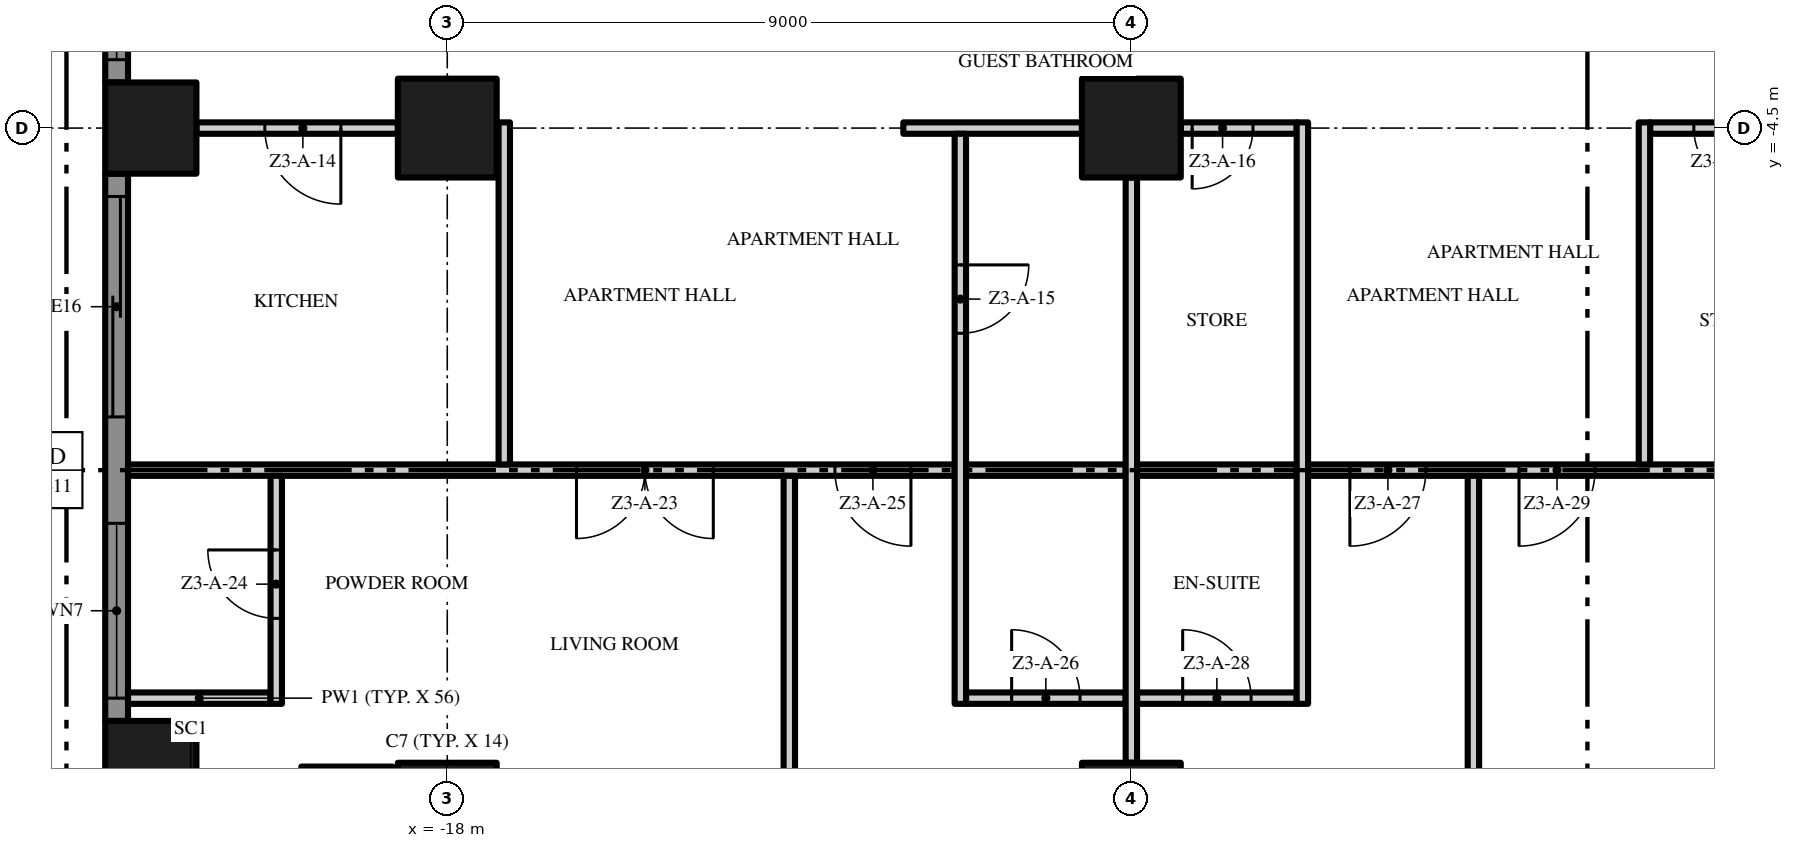
"""IFC4 building model, lengths in metres.
Left out: names, types, materials, properties, quantities, classifications, styles, units other than length and angle.
Written with IfcOpenShell. Run it as: python <this file> out.ifc"""

import sys

from ifc_helpers import new_model, si_unit, direction, frame, frame_2d, origin, origin_2d, place, context, subcontext, project, spatial, polyline, rectangle, outline, extrude, element, fill, save


model = new_model("IFC4")
c1 = context("Model", 3, precision=1e-05, world=origin(), true_north=direction((0.0, 1.0)))
c2 = subcontext(c1, "Body", "Model", "MODEL_VIEW")
j1 = project(units=[si_unit("LENGTHUNIT", "METRE"), si_unit("PLANEANGLEUNIT", "RADIAN")], contexts=[c1])
p1 = place(None, origin())
s1 = spatial("IfcSite", under=j1, at=p1, CompositionType="ELEMENT")
p2 = place(p1, origin())
s2 = spatial("IfcBuilding", under=s1, at=p2, CompositionType="ELEMENT")
p3 = place(p2, frame((0.0, 0.0, 132.6)))
s3 = spatial("IfcBuildingStorey", under=s2, at=p3, CompositionType="ELEMENT", Elevation=132.6)
for number, where, z_axis, x_axis in (
    (1, (-18.0, -13.5, 0.0), (0.0, 0.0, 1.0), (1.0, 0.0, 0.0)),
    (2, (-18.0, -4.5, 0.0), (0.0, 0.0, 1.0), (1.0, 0.0, 0.0)),
):
    element("IfcColumn", number, at=place(p3, frame(where, z_axis=z_axis, x_axis=x_axis)), inside=s3, PredefinedType="COLUMN", context=c2, shape_type="SweptSolid", body=[
        extrude(rectangle(XDim=1.3, YDim=1.3, at=origin_2d()), origin(), (0.0, 0.0, 1.0), 3.5),
    ])
for number, where, z_axis, x_axis in (
    (3, (-21.9, -12.9, 0.0), (0.0, 0.0, 1.0), (1.0, 0.0, 0.0)),
    (4, (-19.32, -13.5, 0.0), (0.0, 0.0, 1.0), (1.0, 0.0, 0.0)),
    (5, (-21.9, -4.5, 0.0), (0.0, 0.0, 1.0), (1.0, 0.0, 0.0)),
):
    element("IfcColumn", number, at=place(p3, frame(where, z_axis=z_axis, x_axis=x_axis)), inside=s3, PredefinedType="COLUMN", context=c2, shape_type="SweptSolid", body=[
        extrude(rectangle(XDim=1.2, YDim=1.2, at=origin_2d()), origin(), (0.0, 0.0, 1.0), 3.5),
    ])
for number, where, z_axis, x_axis in (
    (6, (-9.0, -13.5, 0.0), (0.0, 0.0, 1.0), (1.0, 0.0, 0.0)),
    (7, (-9.0, -4.5, 0.0), (0.0, 0.0, 1.0), (1.0, 0.0, 0.0)),
):
    element("IfcColumn", number, at=place(p3, frame(where, z_axis=z_axis, x_axis=x_axis)), inside=s3, PredefinedType="COLUMN", context=c2, shape_type="SweptSolid", body=[
        extrude(rectangle(XDim=1.3, YDim=1.3, at=origin_2d()), origin(), (0.0, 0.0, 1.0), 3.5),
    ])
p4 = place(p3, frame((-22.35, -3.9, 0.0), z_axis=(0.0, 0.0, 1.0), x_axis=(0.0, 1.0, 0.0)))
e8 = element("IfcWall", 8, at=p4, inside=s3, PredefinedType="SOLIDWALL", context=c2, shape_type="SweptSolid", body=[
    extrude(rectangle(XDim=7.8, YDim=0.3, at=frame_2d((3.9, 0.0))), origin(), (0.0, 0.0, 1.0), 3.5),
])
p5 = place(p4, frame((4.6, 0.0, 0.45)))
e9 = element("IfcOpeningElement", 9, at=p5, cuts=e8, PredefinedType="OPENING", context=c2, shape_type="SweptSolid", body=[
    extrude(rectangle(XDim=2.9, YDim=2.65, at=frame_2d((1.45, 1.325))), frame((0.0, 0.16, 0.0), z_axis=(0.0, -1.0, 0.0), x_axis=(1.0, 0.0, 0.0)), (0.0, 0.0, 1.0), 0.32),
])
p6 = place(p4, frame((0.3, 0.0, 0.45)))
e10 = element("IfcOpeningElement", 10, at=p6, cuts=e8, PredefinedType="OPENING", context=c2, shape_type="SweptSolid", body=[
    extrude(rectangle(XDim=2.9, YDim=2.65, at=frame_2d((1.45, 1.325))), frame((0.0, 0.16, 0.0), z_axis=(0.0, -1.0, 0.0), x_axis=(1.0, 0.0, 0.0)), (0.0, 0.0, 1.0), 0.32),
])
p7 = place(p3, frame((-22.35, -12.3, 0.0), z_axis=(0.0, 0.0, 1.0), x_axis=(0.0, 1.0, 0.0)))
e11 = element("IfcWall", 11, at=p7, inside=s3, PredefinedType="SOLIDWALL", context=c2, shape_type="SweptSolid", body=[
    extrude(rectangle(XDim=7.2, YDim=0.3, at=frame_2d((3.6, 0.0))), origin(), (0.0, 0.0, 1.0), 3.5),
])
p8 = place(p7, frame((4.0, 0.0, 0.0)))
e12 = element("IfcOpeningElement", 12, at=p8, cuts=e11, PredefinedType="OPENING", context=c2, shape_type="SweptSolid", body=[
    extrude(rectangle(XDim=2.9, YDim=2.4, at=frame_2d((1.45, 1.2))), frame((0.0, 0.16, 0.0), z_axis=(0.0, -1.0, 0.0), x_axis=(1.0, 0.0, 0.0)), (0.0, 0.0, 1.0), 0.32),
])
p9 = place(p7, frame((0.3, 0.0, 0.45)))
e13 = element("IfcOpeningElement", 13, at=p9, cuts=e11, PredefinedType="OPENING", context=c2, shape_type="SweptSolid", body=[
    extrude(rectangle(XDim=2.3, YDim=2.65, at=frame_2d((1.15, 1.325))), frame((0.0, 0.16, 0.0), z_axis=(0.0, -1.0, 0.0), x_axis=(1.0, 0.0, 0.0)), (0.0, 0.0, 1.0), 0.32),
])
p10 = place(p3, origin())
e14 = element("IfcWall", 14, at=p10, inside=s3, PredefinedType="USERDEFINED", context=c2, shape_type="SweptSolid", body=[
    extrude(outline(polyline([(-23.451, 18.0), (-23.115, 16.5), (-23.1, 16.125), (-23.231, 15.0), (-23.755, 13.5), (-24.488, 12.0), (-25.149, 10.5), (-25.485, 9.0), (-25.5, 8.625), (-25.369, 7.5), (-24.845, 6.0), (-24.112, 4.5), (-23.451, 3.0), (-23.115, 1.5), (-23.1, 1.125), (-23.231, 0.0), (-23.755, -1.5), (-24.488, -3.0), (-25.149, -4.5), (-25.485, -6.0), (-25.5, -6.375), (-25.369, -7.5), (-24.845, -9.0), (-24.112, -10.5), (-23.451, -12.0), (-23.115, -13.5), (-22.871, -13.445), (-23.213, -11.921), (-23.885, -10.395), (-24.614, -8.904), (-25.124, -7.444), (-25.249, -6.365), (-25.236, -6.033), (-24.91, -4.579), (-24.261, -3.105), (-23.524, -1.596), (-22.986, -0.056), (-22.849, 1.115), (-22.866, 1.533), (-23.213, 3.079), (-23.885, 4.605), (-24.614, 6.096), (-25.124, 7.556), (-25.249, 8.635), (-25.236, 8.967), (-24.91, 10.421), (-24.261, 11.895), (-23.524, 13.404), (-22.986, 14.944), (-22.849, 16.115), (-22.866, 16.533), (-23.208, 18.055), (-23.451, 18.0)])), origin(), (0.0, 0.0, 1.0), 0.9),
])
p11 = place(p3, frame((-22.2, -12.0, 0.0), z_axis=(0.0, 0.0, 1.0), x_axis=(1.0, 0.0, 0.0)))
e15 = element("IfcWall", 15, at=p11, inside=s3, PredefinedType="PARTITIONING", context=c2, shape_type="SweptSolid", body=[
    extrude(rectangle(XDim=1.875, YDim=0.15, at=frame_2d((0.938, 0.0))), origin(), (0.0, 0.0, 1.0), 3.5),
])
p12 = place(p3, frame((-11.175, -12.0, 0.0), z_axis=(0.0, 0.0, 1.0), x_axis=(1.0, 0.0, 0.0)))
e16 = element("IfcWall", 16, at=p12, inside=s3, PredefinedType="PARTITIONING", context=c2, shape_type="SweptSolid", body=[
    extrude(rectangle(XDim=2.1, YDim=0.15, at=frame_2d((1.05, 0.0))), origin(), (0.0, 0.0, 1.0), 3.5),
])
p13 = place(p12, frame((0.6, 0.0, 0.0)))
e17 = element("IfcOpeningElement", 17, at=p13, cuts=e16, PredefinedType="OPENING", context=c2, shape_type="SweptSolid", body=[
    extrude(rectangle(XDim=0.9, YDim=2.1, at=frame_2d((0.45, 1.05))), frame((0.0, 0.085, 0.0), z_axis=(0.0, -1.0, 0.0), x_axis=(1.0, 0.0, 0.0)), (0.0, 0.0, 1.0), 0.17),
])
p14 = place(p3, frame((-8.925, -12.0, 0.0), z_axis=(0.0, 0.0, 1.0), x_axis=(1.0, 0.0, 0.0)))
e18 = element("IfcWall", 18, at=p14, inside=s3, PredefinedType="PARTITIONING", context=c2, shape_type="SweptSolid", body=[
    extrude(rectangle(XDim=2.1, YDim=0.15, at=frame_2d((1.05, 0.0))), origin(), (0.0, 0.0, 1.0), 3.5),
])
p15 = place(p14, frame((0.6, 0.0, 0.0)))
e19 = element("IfcOpeningElement", 19, at=p15, cuts=e18, PredefinedType="OPENING", context=c2, shape_type="SweptSolid", body=[
    extrude(rectangle(XDim=0.9, YDim=2.1, at=frame_2d((0.45, 1.05))), frame((0.0, 0.085, 0.0), z_axis=(0.0, -1.0, 0.0), x_axis=(1.0, 0.0, 0.0)), (0.0, 0.0, 1.0), 0.17),
])
p16 = place(p3, frame((-11.325, -9.0, 0.0), z_axis=(0.0, 0.0, 1.0), x_axis=(-1.0, 0.0, 0.0)))
e20 = element("IfcWall", 20, at=p16, inside=s3, PredefinedType="PARTITIONING", context=c2, shape_type="SweptSolid", body=[
    extrude(rectangle(XDim=10.875, YDim=0.15, at=frame_2d((5.438, 0.0))), origin(), (0.0, 0.0, 1.0), 3.5),
])
p17 = place(p16, frame((3.175, 0.0, 0.0)))
e21 = element("IfcOpeningElement", 21, at=p17, cuts=e20, PredefinedType="OPENING", context=c2, shape_type="SweptSolid", body=[
    extrude(rectangle(XDim=1.8, YDim=2.4, at=frame_2d((0.9, 1.2))), frame((0.0, 0.085, 0.0), z_axis=(0.0, -1.0, 0.0), x_axis=(1.0, 0.0, 0.0)), (0.0, 0.0, 1.0), 0.17),
])
p18 = place(p16, frame((0.575, 0.0, 0.0)))
e22 = element("IfcOpeningElement", 22, at=p18, cuts=e20, PredefinedType="OPENING", context=c2, shape_type="SweptSolid", body=[
    extrude(rectangle(XDim=1.0, YDim=2.4, at=frame_2d((0.5, 1.2))), frame((0.0, 0.085, 0.0), z_axis=(0.0, -1.0, 0.0), x_axis=(1.0, 0.0, 0.0)), (0.0, 0.0, 1.0), 0.17),
])
for number, where, z_axis, x_axis in (
    (23, (-11.175, -9.0, 0.0), (0.0, 0.0, 1.0), (1.0, 0.0, 0.0)),
    (24, (-8.925, -9.0, 0.0), (0.0, 0.0, 1.0), (1.0, 0.0, 0.0)),
):
    element("IfcWall", number, at=place(p3, frame(where, z_axis=z_axis, x_axis=x_axis)), inside=s3, PredefinedType="PARTITIONING", context=c2, shape_type="SweptSolid", body=[
        extrude(rectangle(XDim=2.1, YDim=0.15, at=frame_2d((1.05, 0.0))), origin(), (0.0, 0.0, 1.0), 3.5),
    ])
p19 = place(p3, frame((-0.075, -9.0, 0.0), z_axis=(0.0, 0.0, 1.0), x_axis=(-1.0, 0.0, 0.0)))
e25 = element("IfcWall", 25, at=p19, inside=s3, PredefinedType="PARTITIONING", context=c2, shape_type="SweptSolid", body=[
    extrude(rectangle(XDim=6.6, YDim=0.15, at=frame_2d((3.3, 0.0))), origin(), (0.0, 0.0, 1.0), 3.5),
])
p20 = place(p19, frame((5.05, 0.0, 0.0)))
e26 = element("IfcOpeningElement", 26, at=p20, cuts=e25, PredefinedType="OPENING", context=c2, shape_type="SweptSolid", body=[
    extrude(rectangle(XDim=1.0, YDim=2.4, at=frame_2d((0.5, 1.2))), frame((0.0, 0.085, 0.0), z_axis=(0.0, -1.0, 0.0), x_axis=(1.0, 0.0, 0.0)), (0.0, 0.0, 1.0), 0.17),
])
p21 = place(p19, frame((2.825, 0.0, 0.0)))
e27 = element("IfcOpeningElement", 27, at=p21, cuts=e25, PredefinedType="OPENING", context=c2, shape_type="SweptSolid", body=[
    extrude(rectangle(XDim=1.0, YDim=2.4, at=frame_2d((0.5, 1.2))), frame((0.0, 0.085, 0.0), z_axis=(0.0, -1.0, 0.0), x_axis=(1.0, 0.0, 0.0)), (0.0, 0.0, 1.0), 0.17),
])
p22 = place(p3, frame((-18.65, -4.5, 0.0), z_axis=(0.0, 0.0, 1.0), x_axis=(-1.0, 0.0, 0.0)))
e28 = element("IfcWall", 28, at=p22, inside=s3, PredefinedType="PARTITIONING", context=c2, shape_type="SweptSolid", body=[
    extrude(rectangle(XDim=2.65, YDim=0.15, at=frame_2d((1.325, 0.0))), origin(), (0.0, 0.0, 1.0), 3.5),
])
p23 = place(p22, frame((0.75, 0.0, 0.0)))
e29 = element("IfcOpeningElement", 29, at=p23, cuts=e28, PredefinedType="OPENING", context=c2, shape_type="SweptSolid", body=[
    extrude(rectangle(XDim=1.0, YDim=2.4, at=frame_2d((0.5, 1.2))), frame((0.0, 0.085, 0.0), z_axis=(0.0, -1.0, 0.0), x_axis=(1.0, 0.0, 0.0)), (0.0, 0.0, 1.0), 0.17),
])
p24 = place(p3, frame((-12.0, -4.5, 0.0), z_axis=(0.0, 0.0, 1.0), x_axis=(1.0, 0.0, 0.0)))
e30 = element("IfcWall", 30, at=p24, inside=s3, PredefinedType="PARTITIONING", context=c2, shape_type="SweptSolid", body=[
    extrude(rectangle(XDim=2.35, YDim=0.15, at=frame_2d((1.175, 0.0))), origin(), (0.0, 0.0, 1.0), 3.5),
])
p25 = place(p3, frame((-6.825, -4.5, 0.0), z_axis=(0.0, 0.0, 1.0), x_axis=(-1.0, 0.0, 0.0)))
e31 = element("IfcWall", 31, at=p25, inside=s3, PredefinedType="PARTITIONING", context=c2, shape_type="SweptSolid", body=[
    extrude(rectangle(XDim=1.525, YDim=0.15, at=frame_2d((0.762, 0.0))), origin(), (0.0, 0.0, 1.0), 3.5),
])
p26 = place(p25, frame((0.575, 0.0, 0.0)))
e32 = element("IfcOpeningElement", 32, at=p26, cuts=e31, PredefinedType="OPENING", context=c2, shape_type="SweptSolid", body=[
    extrude(rectangle(XDim=0.8, YDim=2.0, at=frame_2d((0.4, 1.0))), frame((0.0, 0.085, 0.0), z_axis=(0.0, -1.0, 0.0), x_axis=(1.0, 0.0, 0.0)), (0.0, 0.0, 1.0), 0.17),
])
p27 = place(p3, frame((-0.65, -4.5, 0.0), z_axis=(0.0, 0.0, 1.0), x_axis=(-1.0, 0.0, 0.0)))
e33 = element("IfcWall", 33, at=p27, inside=s3, PredefinedType="PARTITIONING", context=c2, shape_type="SweptSolid", body=[
    extrude(rectangle(XDim=1.525, YDim=0.15, at=frame_2d((0.762, 0.0))), origin(), (0.0, 0.0, 1.0), 3.5),
])
p28 = place(p27, frame((0.15, 0.0, 0.0)))
e34 = element("IfcOpeningElement", 34, at=p28, cuts=e33, PredefinedType="OPENING", context=c2, shape_type="SweptSolid", body=[
    extrude(rectangle(XDim=0.8, YDim=2.0, at=frame_2d((0.4, 1.0))), frame((0.0, 0.085, 0.0), z_axis=(0.0, -1.0, 0.0), x_axis=(1.0, 0.0, 0.0)), (0.0, 0.0, 1.0), 0.17),
])
p29 = place(p3, frame((-20.25, -12.075, 0.0), z_axis=(0.0, 0.0, 1.0), x_axis=(0.0, 1.0, 0.0)))
e35 = element("IfcWall", 35, at=p29, inside=s3, PredefinedType="PARTITIONING", context=c2, shape_type="SweptSolid", body=[
    extrude(rectangle(XDim=3.0, YDim=0.15, at=frame_2d((1.5, 0.0))), origin(), (0.0, 0.0, 1.0), 3.5),
])
p30 = place(p29, frame((1.125, 0.0, 0.0)))
e36 = element("IfcOpeningElement", 36, at=p30, cuts=e35, PredefinedType="OPENING", context=c2, shape_type="SweptSolid", body=[
    extrude(rectangle(XDim=0.9, YDim=2.1, at=frame_2d((0.45, 1.05))), frame((0.0, 0.085, 0.0), z_axis=(0.0, -1.0, 0.0), x_axis=(1.0, 0.0, 0.0)), (0.0, 0.0, 1.0), 0.17),
])
p31 = place(p3, frame((-17.25, -8.925, 0.0), z_axis=(0.0, 0.0, 1.0), x_axis=(0.0, 1.0, 0.0)))
e37 = element("IfcWall", 37, at=p31, inside=s3, PredefinedType="PARTITIONING", context=c2, shape_type="SweptSolid", body=[
    extrude(rectangle(XDim=4.5, YDim=0.15, at=frame_2d((2.25, 0.0))), origin(), (0.0, 0.0, 1.0), 3.5),
])
p32 = place(p3, frame((-13.5, -17.7, 0.0), z_axis=(0.0, 0.0, 1.0), x_axis=(0.0, 1.0, 0.0)))
e38 = element("IfcWall", 38, at=p32, inside=s3, PredefinedType="PARTITIONING", context=c2, shape_type="SweptSolid", body=[
    extrude(rectangle(XDim=8.625, YDim=0.15, at=frame_2d((4.312, 0.0))), origin(), (0.0, 0.0, 1.0), 3.5),
])
p33 = place(p3, frame((-11.25, -4.575, 0.0), z_axis=(0.0, 0.0, 1.0), x_axis=(0.0, -1.0, 0.0)))
e39 = element("IfcWall", 39, at=p33, inside=s3, PredefinedType="PARTITIONING", context=c2, shape_type="SweptSolid", body=[
    extrude(rectangle(XDim=7.5, YDim=0.15, at=frame_2d((3.75, 0.0))), origin(), (0.0, 0.0, 1.0), 3.5),
])
p34 = place(p33, frame((1.725, 0.0, 0.0)))
e40 = element("IfcOpeningElement", 40, at=p34, cuts=e39, PredefinedType="OPENING", context=c2, shape_type="SweptSolid", body=[
    extrude(rectangle(XDim=0.9, YDim=2.1, at=frame_2d((0.45, 1.05))), frame((0.0, 0.085, 0.0), z_axis=(0.0, -1.0, 0.0), x_axis=(1.0, 0.0, 0.0)), (0.0, 0.0, 1.0), 0.17),
])
p35 = place(p3, frame((-9.0, -12.85, 0.0), z_axis=(0.0, 0.0, 1.0), x_axis=(0.0, 1.0, 0.0)))
e41 = element("IfcWall", 41, at=p35, inside=s3, PredefinedType="PARTITIONING", context=c2, shape_type="SweptSolid", body=[
    extrude(rectangle(XDim=7.7, YDim=0.15, at=frame_2d((3.85, 0.0))), origin(), (0.0, 0.0, 1.0), 3.5),
])
p36 = place(p3, frame((-6.75, -12.075, 0.0), z_axis=(0.0, 0.0, 1.0), x_axis=(0.0, 1.0, 0.0)))
e42 = element("IfcWall", 42, at=p36, inside=s3, PredefinedType="PARTITIONING", context=c2, shape_type="SweptSolid", body=[
    extrude(rectangle(XDim=7.65, YDim=0.15, at=frame_2d((3.825, 0.0))), origin(), (0.0, 0.0, 1.0), 3.5),
])
p37 = place(p3, frame((-4.5, -17.7, 0.0), z_axis=(0.0, 0.0, 1.0), x_axis=(0.0, 1.0, 0.0)))
e43 = element("IfcWall", 43, at=p37, inside=s3, PredefinedType="PARTITIONING", context=c2, shape_type="SweptSolid", body=[
    extrude(rectangle(XDim=8.625, YDim=0.15, at=frame_2d((4.312, 0.0))), origin(), (0.0, 0.0, 1.0), 3.5),
])
p38 = place(p3, frame((-2.25, -8.925, 0.0), z_axis=(0.0, 0.0, 1.0), x_axis=(0.0, 1.0, 0.0)))
e44 = element("IfcWall", 44, at=p38, inside=s3, PredefinedType="PARTITIONING", context=c2, shape_type="SweptSolid", body=[
    extrude(rectangle(XDim=4.5, YDim=0.15, at=frame_2d((2.25, 0.0))), origin(), (0.0, 0.0, 1.0), 3.5),
])
p39 = place(p6, origin())
e45 = element("IfcWindow", 45, at=p39, inside=s3, PartitioningType="SINGLE_PANEL", PredefinedType="WINDOW", context=c2, shape_type="SweptSolid", body=[
    extrude(rectangle(XDim=2.9, YDim=2.65, at=frame_2d((1.45, 1.325))), frame((0.0, 0.03, 0.0), z_axis=(0.0, -1.0, 0.0), x_axis=(1.0, 0.0, 0.0)), (0.0, 0.0, 1.0), 0.06),
])
fill(e10, e45)
p40 = place(p8, origin())
e46 = element("IfcDoor", 46, at=p40, inside=s3, OperationType="SINGLE_SWING_LEFT", PredefinedType="DOOR", context=c2, shape_type="SweptSolid", body=[
    extrude(rectangle(XDim=2.9, YDim=2.4, at=frame_2d((1.45, 1.2))), frame((0.0, 0.025, 0.0), z_axis=(0.0, -1.0, 0.0), x_axis=(1.0, 0.0, 0.0)), (0.0, 0.0, 1.0), 0.05),
])
fill(e12, e46)
p41 = place(p9, origin())
e47 = element("IfcWindow", 47, at=p41, inside=s3, PartitioningType="SINGLE_PANEL", PredefinedType="WINDOW", context=c2, shape_type="SweptSolid", body=[
    extrude(rectangle(XDim=2.3, YDim=2.65, at=frame_2d((1.15, 1.325))), frame((0.0, 0.03, 0.0), z_axis=(0.0, -1.0, 0.0), x_axis=(1.0, 0.0, 0.0)), (0.0, 0.0, 1.0), 0.06),
])
fill(e13, e47)
p42 = place(p23, origin())
e48 = element("IfcDoor", 48, at=p42, inside=s3, OperationType="SINGLE_SWING_LEFT", PredefinedType="DOOR", context=c2, shape_type="SweptSolid", body=[
    extrude(rectangle(XDim=1.0, YDim=2.4, at=frame_2d((0.5, 1.2))), frame((0.0, 0.025, 0.0), z_axis=(0.0, -1.0, 0.0), x_axis=(1.0, 0.0, 0.0)), (0.0, 0.0, 1.0), 0.05),
])
fill(e29, e48)
p43 = place(p34, origin())
e49 = element("IfcDoor", 49, at=p43, inside=s3, OperationType="SINGLE_SWING_LEFT", PredefinedType="DOOR", context=c2, shape_type="SweptSolid", body=[
    extrude(rectangle(XDim=0.9, YDim=2.1, at=frame_2d((0.45, 1.05))), frame((0.0, 0.025, 0.0), z_axis=(0.0, -1.0, 0.0), x_axis=(1.0, 0.0, 0.0)), (0.0, 0.0, 1.0), 0.05),
])
fill(e40, e49)
p44 = place(p26, origin())
e50 = element("IfcDoor", 50, at=p44, inside=s3, OperationType="SINGLE_SWING_RIGHT", PredefinedType="DOOR", context=c2, shape_type="SweptSolid", body=[
    extrude(rectangle(XDim=0.8, YDim=2.0, at=frame_2d((0.4, 1.0))), frame((0.0, 0.025, 0.0), z_axis=(0.0, -1.0, 0.0), x_axis=(1.0, 0.0, 0.0)), (0.0, 0.0, 1.0), 0.05),
])
fill(e32, e50)
p45 = place(p28, origin())
e51 = element("IfcDoor", 51, at=p45, inside=s3, OperationType="SINGLE_SWING_LEFT", PredefinedType="DOOR", context=c2, shape_type="SweptSolid", body=[
    extrude(rectangle(XDim=0.8, YDim=2.0, at=frame_2d((0.4, 1.0))), frame((0.0, 0.025, 0.0), z_axis=(0.0, -1.0, 0.0), x_axis=(1.0, 0.0, 0.0)), (0.0, 0.0, 1.0), 0.05),
])
fill(e34, e51)
p46 = place(p17, origin())
e52 = element("IfcDoor", 52, at=p46, inside=s3, OperationType="DOUBLE_DOOR_SINGLE_SWING", PredefinedType="DOOR", context=c2, shape_type="SweptSolid", body=[
    extrude(rectangle(XDim=1.8, YDim=2.4, at=frame_2d((0.9, 1.2))), frame((0.0, 0.025, 0.0), z_axis=(0.0, -1.0, 0.0), x_axis=(1.0, 0.0, 0.0)), (0.0, 0.0, 1.0), 0.05),
])
fill(e21, e52)
p47 = place(p30, origin())
e53 = element("IfcDoor", 53, at=p47, inside=s3, OperationType="SINGLE_SWING_RIGHT", PredefinedType="DOOR", context=c2, shape_type="SweptSolid", body=[
    extrude(rectangle(XDim=0.9, YDim=2.1, at=frame_2d((0.45, 1.05))), frame((0.0, 0.025, 0.0), z_axis=(0.0, -1.0, 0.0), x_axis=(1.0, 0.0, 0.0)), (0.0, 0.0, 1.0), 0.05),
])
fill(e36, e53)
p48 = place(p18, origin())
e54 = element("IfcDoor", 54, at=p48, inside=s3, OperationType="SINGLE_SWING_LEFT", PredefinedType="DOOR", context=c2, shape_type="SweptSolid", body=[
    extrude(rectangle(XDim=1.0, YDim=2.4, at=frame_2d((0.5, 1.2))), frame((0.0, 0.025, 0.0), z_axis=(0.0, -1.0, 0.0), x_axis=(1.0, 0.0, 0.0)), (0.0, 0.0, 1.0), 0.05),
])
fill(e22, e54)
p49 = place(p13, origin())
e55 = element("IfcDoor", 55, at=p49, inside=s3, OperationType="SINGLE_SWING_LEFT", PredefinedType="DOOR", context=c2, shape_type="SweptSolid", body=[
    extrude(rectangle(XDim=0.9, YDim=2.1, at=frame_2d((0.45, 1.05))), frame((0.0, 0.025, 0.0), z_axis=(0.0, -1.0, 0.0), x_axis=(1.0, 0.0, 0.0)), (0.0, 0.0, 1.0), 0.05),
])
fill(e17, e55)
p50 = place(p20, origin())
e56 = element("IfcDoor", 56, at=p50, inside=s3, OperationType="SINGLE_SWING_RIGHT", PredefinedType="DOOR", context=c2, shape_type="SweptSolid", body=[
    extrude(rectangle(XDim=1.0, YDim=2.4, at=frame_2d((0.5, 1.2))), frame((0.0, 0.025, 0.0), z_axis=(0.0, -1.0, 0.0), x_axis=(1.0, 0.0, 0.0)), (0.0, 0.0, 1.0), 0.05),
])
fill(e26, e56)
p51 = place(p15, origin())
e57 = element("IfcDoor", 57, at=p51, inside=s3, OperationType="SINGLE_SWING_LEFT", PredefinedType="DOOR", context=c2, shape_type="SweptSolid", body=[
    extrude(rectangle(XDim=0.9, YDim=2.1, at=frame_2d((0.45, 1.05))), frame((0.0, 0.025, 0.0), z_axis=(0.0, -1.0, 0.0), x_axis=(1.0, 0.0, 0.0)), (0.0, 0.0, 1.0), 0.05),
])
fill(e19, e57)
p52 = place(p21, origin())
e58 = element("IfcDoor", 58, at=p52, inside=s3, OperationType="SINGLE_SWING_RIGHT", PredefinedType="DOOR", context=c2, shape_type="SweptSolid", body=[
    extrude(rectangle(XDim=1.0, YDim=2.4, at=frame_2d((0.5, 1.2))), frame((0.0, 0.025, 0.0), z_axis=(0.0, -1.0, 0.0), x_axis=(1.0, 0.0, 0.0)), (0.0, 0.0, 1.0), 0.05),
])
fill(e27, e58)
save(model, sys.argv[1])
